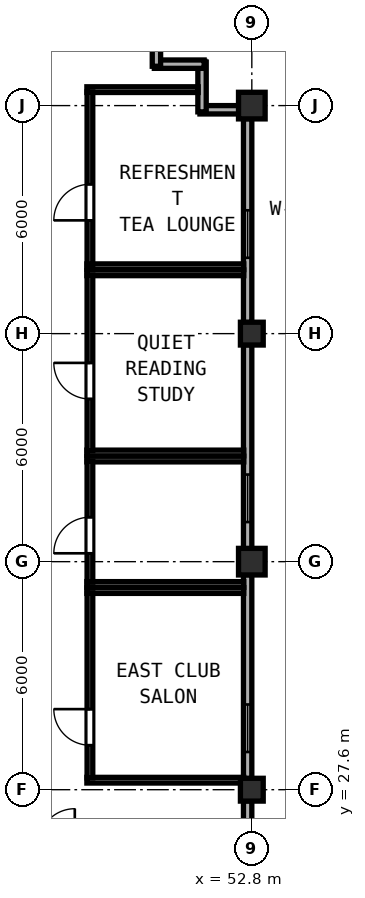
"""IFC4 building model, lengths in metres.
Left out: names, types, materials, properties, quantities, classifications, styles, units other than length and angle.
Written with IfcOpenShell. Run it as: python <this file> out.ifc"""

import sys

from ifc_helpers import new_model, si_unit, direction, frame, frame_2d, origin, origin_2d, place, context, subcontext, project, spatial, rectangle, hollow_rectangle, extrude, element, fill, save


model = new_model("IFC4")
c1 = context("Model", 3, precision=1e-05, world=origin(), true_north=direction((0.0, 1.0)))
c2 = subcontext(c1, "Body", "Model", "MODEL_VIEW")
j1 = project(units=[si_unit("LENGTHUNIT", "METRE"), si_unit("PLANEANGLEUNIT", "RADIAN")], contexts=[c1])
p1 = place(None, origin())
s1 = spatial("IfcSite", under=j1, at=p1, CompositionType="ELEMENT")
p2 = place(p1, origin())
s2 = spatial("IfcBuilding", under=s1, at=p2, CompositionType="ELEMENT")
p3 = place(p2, frame((0.0, 0.0, 293.9)))
s3 = spatial("IfcBuildingStorey", under=s2, at=p3, CompositionType="ELEMENT", Elevation=293.9)
for number, where, z_axis, x_axis in (
    (1, (52.8, 33.6, 0.0), (0.0, 0.0, 1.0), (1.0, 0.0, 0.0)),
    (2, (52.8, 45.6, 0.0), (0.0, 0.0, 1.0), (1.0, 0.0, 0.0)),
):
    element("IfcColumn", number, at=place(p3, frame(where, z_axis=z_axis, x_axis=x_axis)), inside=s3, PredefinedType="COLUMN", context=c2, shape_type="SweptSolid", body=[
        extrude(hollow_rectangle(XDim=0.7, YDim=0.7, WallThickness=0.026, at=origin_2d()), origin(), (0.0, 0.0, 1.0), 3.9),
    ])
for number, where, z_axis, x_axis in (
    (3, (52.8, 27.6, 0.0), (0.0, 0.0, 1.0), (1.0, 0.0, 0.0)),
    (4, (52.8, 39.6, 0.0), (0.0, 0.0, 1.0), (1.0, 0.0, 0.0)),
):
    element("IfcColumn", number, at=place(p3, frame(where, z_axis=z_axis, x_axis=x_axis)), inside=s3, PredefinedType="COLUMN", context=c2, shape_type="SweptSolid", body=[
        extrude(hollow_rectangle(XDim=0.6, YDim=0.6, WallThickness=0.024, at=origin_2d()), origin(), (0.0, 0.0, 1.0), 3.9),
    ])
p4 = place(p3, frame((52.69, 21.942, 0.0), z_axis=(0.0, 0.0, 1.0), x_axis=(0.0, 1.0, 0.0)))
e5 = element("IfcWall", 5, at=p4, inside=s3, PredefinedType="SOLIDWALL", context=c2, shape_type="SweptSolid", body=[
    extrude(rectangle(XDim=5.366, YDim=0.22, at=frame_2d((2.683, 0.0))), origin(), (0.0, 0.0, 1.0), 3.365),
])
p5 = place(p4, frame((0.7, 0.0, 0.85)))
e6 = element("IfcOpeningElement", 6, at=p5, cuts=e5, PredefinedType="OPENING", context=c2, shape_type="SweptSolid", body=[
    extrude(rectangle(XDim=1.25, YDim=1.95, at=frame_2d((0.625, 0.975))), frame((0.0, 0.12, 0.0), z_axis=(0.0, -1.0, 0.0), x_axis=(1.0, 0.0, 0.0)), (0.0, 0.0, 1.0), 0.24),
])
p6 = place(p3, frame((52.69, 27.892, 0.0), z_axis=(0.0, 0.0, 1.0), x_axis=(0.0, 1.0, 0.0)))
e7 = element("IfcWall", 7, at=p6, inside=s3, PredefinedType="SOLIDWALL", context=c2, shape_type="SweptSolid", body=[
    extrude(rectangle(XDim=5.366, YDim=0.22, at=frame_2d((2.683, 0.0))), origin(), (0.0, 0.0, 1.0), 3.365),
])
p7 = place(p6, frame((0.7, 0.0, 0.85)))
e8 = element("IfcOpeningElement", 8, at=p7, cuts=e7, PredefinedType="OPENING", context=c2, shape_type="SweptSolid", body=[
    extrude(rectangle(XDim=1.25, YDim=1.95, at=frame_2d((0.625, 0.975))), frame((0.0, 0.12, 0.0), z_axis=(0.0, -1.0, 0.0), x_axis=(1.0, 0.0, 0.0)), (0.0, 0.0, 1.0), 0.24),
])
p8 = place(p3, frame((52.69, 33.942, 0.0), z_axis=(0.0, 0.0, 1.0), x_axis=(0.0, 1.0, 0.0)))
e9 = element("IfcWall", 9, at=p8, inside=s3, PredefinedType="SOLIDWALL", context=c2, shape_type="SweptSolid", body=[
    extrude(rectangle(XDim=5.366, YDim=0.22, at=frame_2d((2.683, 0.0))), origin(), (0.0, 0.0, 1.0), 3.365),
])
p9 = place(p8, frame((0.7, 0.0, 0.85)))
e10 = element("IfcOpeningElement", 10, at=p9, cuts=e9, PredefinedType="OPENING", context=c2, shape_type="SweptSolid", body=[
    extrude(rectangle(XDim=1.25, YDim=1.95, at=frame_2d((0.625, 0.975))), frame((0.0, 0.12, 0.0), z_axis=(0.0, -1.0, 0.0), x_axis=(1.0, 0.0, 0.0)), (0.0, 0.0, 1.0), 0.24),
])
p10 = place(p3, frame((52.69, 39.892, 0.0), z_axis=(0.0, 0.0, 1.0), x_axis=(0.0, 1.0, 0.0)))
e11 = element("IfcWall", 11, at=p10, inside=s3, PredefinedType="SOLIDWALL", context=c2, shape_type="SweptSolid", body=[
    extrude(rectangle(XDim=5.366, YDim=0.22, at=frame_2d((2.683, 0.0))), origin(), (0.0, 0.0, 1.0), 3.365),
])
p11 = place(p10, frame((1.703, 0.0, 0.85)))
e12 = element("IfcOpeningElement", 12, at=p11, cuts=e11, PredefinedType="OPENING", context=c2, shape_type="SweptSolid", body=[
    extrude(rectangle(XDim=1.25, YDim=1.95, at=frame_2d((0.625, 0.975))), frame((0.0, 0.12, 0.0), z_axis=(0.0, -1.0, 0.0), x_axis=(1.0, 0.0, 0.0)), (0.0, 0.0, 1.0), 0.24),
])
p12 = place(p3, frame((52.458, 45.49, 0.0), z_axis=(0.0, 0.0, 1.0), x_axis=(-1.0, 0.0, 0.0)))
e13 = element("IfcWall", 13, at=p12, inside=s3, PredefinedType="SOLIDWALL", context=c2, shape_type="SweptSolid", body=[
    extrude(rectangle(XDim=1.023, YDim=0.22, at=frame_2d((0.511, 0.0))), origin(), (0.0, 0.0, 1.0), 3.72),
])
p13 = place(p3, frame((51.49, 45.435, 0.0), z_axis=(0.0, 0.0, 1.0), x_axis=(0.0, 1.0, 0.0)))
e14 = element("IfcWall", 14, at=p13, inside=s3, PredefinedType="SOLIDWALL", context=c2, shape_type="SweptSolid", body=[
    extrude(rectangle(XDim=1.31, YDim=0.22, at=frame_2d((0.655, 0.0))), origin(), (0.0, 0.0, 1.0), 3.72),
])
p14 = place(p3, frame((51.545, 46.69, 0.0), z_axis=(0.0, 0.0, 1.0), x_axis=(-1.0, 0.0, 0.0)))
e15 = element("IfcWall", 15, at=p14, inside=s3, PredefinedType="SOLIDWALL", context=c2, shape_type="SweptSolid", body=[
    extrude(rectangle(XDim=1.31, YDim=0.22, at=frame_2d((0.655, 0.0))), origin(), (0.0, 0.0, 1.0), 3.72),
])
p15 = place(p3, frame((50.29, 46.635, 0.0), z_axis=(0.0, 0.0, 1.0), x_axis=(0.0, 1.0, 0.0)))
e16 = element("IfcWall", 16, at=p15, inside=s3, PredefinedType="SOLIDWALL", context=c2, shape_type="SweptSolid", body=[
    extrude(rectangle(XDim=1.535, YDim=0.22, at=frame_2d((0.768, 0.0))), origin(), (0.0, 0.0, 1.0), 3.72),
])
for number, where, z_axis, x_axis in (
    (17, (48.46, 36.3, 0.0), (0.0, 0.0, 1.0), (1.0, 0.0, 0.0)),
    (18, (48.46, 33.0, 0.0), (0.0, 0.0, 1.0), (1.0, 0.0, 0.0)),
):
    element("IfcWall", number, at=place(p3, frame(where, z_axis=z_axis, x_axis=x_axis)), inside=s3, PredefinedType="PARTITIONING", context=c2, shape_type="SweptSolid", body=[
        extrude(rectangle(XDim=4.128, YDim=0.15, at=frame_2d((2.064, 0.0))), origin(), (0.0, 0.0, 1.0), 3.72),
    ])
p16 = place(p3, frame((48.54, 33.06, 0.0), z_axis=(0.0, 0.0, 1.0), x_axis=(0.0, 1.0, 0.0)))
e19 = element("IfcWall", 19, at=p16, inside=s3, PredefinedType="PARTITIONING", context=c2, shape_type="SweptSolid", body=[
    extrude(rectangle(XDim=3.18, YDim=0.15, at=frame_2d((1.59, 0.0))), origin(), (0.0, 0.0, 1.0), 3.72),
])
p17 = place(p16, frame((0.76, 0.0, 0.0)))
e20 = element("IfcOpeningElement", 20, at=p17, cuts=e19, PredefinedType="OPENING", context=c2, shape_type="SweptSolid", body=[
    extrude(rectangle(XDim=0.95, YDim=2.12, at=frame_2d((0.475, 1.06))), frame((0.0, 0.085, 0.0), z_axis=(0.0, -1.0, 0.0), x_axis=(1.0, 0.0, 0.0)), (0.0, 0.0, 1.0), 0.17),
])
for number, where, z_axis, x_axis in (
    (21, (48.46, 41.2, 0.0), (0.0, 0.0, 1.0), (1.0, 0.0, 0.0)),
    (22, (48.46, 36.46, 0.0), (0.0, 0.0, 1.0), (1.0, 0.0, 0.0)),
):
    element("IfcWall", number, at=place(p3, frame(where, z_axis=z_axis, x_axis=x_axis)), inside=s3, PredefinedType="PARTITIONING", context=c2, shape_type="SweptSolid", body=[
        extrude(rectangle(XDim=4.128, YDim=0.15, at=frame_2d((2.064, 0.0))), origin(), (0.0, 0.0, 1.0), 3.72),
    ])
p18 = place(p3, frame((48.54, 36.52, 0.0), z_axis=(0.0, 0.0, 1.0), x_axis=(0.0, 1.0, 0.0)))
e23 = element("IfcWall", 23, at=p18, inside=s3, PredefinedType="PARTITIONING", context=c2, shape_type="SweptSolid", body=[
    extrude(rectangle(XDim=4.62, YDim=0.15, at=frame_2d((2.31, 0.0))), origin(), (0.0, 0.0, 1.0), 3.72),
])
p19 = place(p18, frame((1.36, 0.0, 0.0)))
e24 = element("IfcOpeningElement", 24, at=p19, cuts=e23, PredefinedType="OPENING", context=c2, shape_type="SweptSolid", body=[
    extrude(rectangle(XDim=0.95, YDim=2.12, at=frame_2d((0.475, 1.06))), frame((0.0, 0.085, 0.0), z_axis=(0.0, -1.0, 0.0), x_axis=(1.0, 0.0, 0.0)), (0.0, 0.0, 1.0), 0.17),
])
p20 = place(p3, frame((48.46, 46.02, 0.0), z_axis=(0.0, 0.0, 1.0), x_axis=(1.0, 0.0, 0.0)))
e25 = element("IfcWall", 25, at=p20, inside=s3, PredefinedType="PARTITIONING", context=c2, shape_type="SweptSolid", body=[
    extrude(rectangle(XDim=2.928, YDim=0.15, at=frame_2d((1.464, 0.0))), origin(), (0.0, 0.0, 1.0), 3.72),
])
p21 = place(p3, frame((48.46, 41.36, 0.0), z_axis=(0.0, 0.0, 1.0), x_axis=(1.0, 0.0, 0.0)))
e26 = element("IfcWall", 26, at=p21, inside=s3, PredefinedType="PARTITIONING", context=c2, shape_type="SweptSolid", body=[
    extrude(rectangle(XDim=4.128, YDim=0.15, at=frame_2d((2.064, 0.0))), origin(), (0.0, 0.0, 1.0), 3.72),
])
p22 = place(p3, frame((48.54, 41.42, 0.0), z_axis=(0.0, 0.0, 1.0), x_axis=(0.0, 1.0, 0.0)))
e27 = element("IfcWall", 27, at=p22, inside=s3, PredefinedType="PARTITIONING", context=c2, shape_type="SweptSolid", body=[
    extrude(rectangle(XDim=4.54, YDim=0.15, at=frame_2d((2.27, 0.0))), origin(), (0.0, 0.0, 1.0), 3.72),
])
p23 = place(p22, frame((1.16, 0.0, 0.0)))
e28 = element("IfcOpeningElement", 28, at=p23, cuts=e27, PredefinedType="OPENING", context=c2, shape_type="SweptSolid", body=[
    extrude(rectangle(XDim=0.95, YDim=2.12, at=frame_2d((0.475, 1.06))), frame((0.0, 0.085, 0.0), z_axis=(0.0, -1.0, 0.0), x_axis=(1.0, 0.0, 0.0)), (0.0, 0.0, 1.0), 0.17),
])
for number, where, z_axis, x_axis in (
    (29, (48.46, 32.84, 0.0), (0.0, 0.0, 1.0), (1.0, 0.0, 0.0)),
    (30, (48.46, 27.85, 0.0), (0.0, 0.0, 1.0), (1.0, 0.0, 0.0)),
):
    element("IfcWall", number, at=place(p3, frame(where, z_axis=z_axis, x_axis=x_axis)), inside=s3, PredefinedType="PARTITIONING", context=c2, shape_type="SweptSolid", body=[
        extrude(rectangle(XDim=4.128, YDim=0.15, at=frame_2d((2.064, 0.0))), origin(), (0.0, 0.0, 1.0), 3.72),
    ])
p24 = place(p3, frame((48.54, 27.91, 0.0), z_axis=(0.0, 0.0, 1.0), x_axis=(0.0, 1.0, 0.0)))
e31 = element("IfcWall", 31, at=p24, inside=s3, PredefinedType="PARTITIONING", context=c2, shape_type="SweptSolid", body=[
    extrude(rectangle(XDim=4.87, YDim=0.15, at=frame_2d((2.435, 0.0))), origin(), (0.0, 0.0, 1.0), 3.72),
])
p25 = place(p24, frame((0.86, 0.0, 0.0)))
e32 = element("IfcOpeningElement", 32, at=p25, cuts=e31, PredefinedType="OPENING", context=c2, shape_type="SweptSolid", body=[
    extrude(rectangle(XDim=0.95, YDim=2.12, at=frame_2d((0.475, 1.06))), frame((0.0, 0.085, 0.0), z_axis=(0.0, -1.0, 0.0), x_axis=(1.0, 0.0, 0.0)), (0.0, 0.0, 1.0), 0.17),
])
p26 = place(p7, origin())
e33 = element("IfcWindow", 33, at=p26, inside=s3, PartitioningType="SINGLE_PANEL", PredefinedType="WINDOW", context=c2, shape_type="SweptSolid", body=[
    extrude(rectangle(XDim=1.25, YDim=1.95, at=frame_2d((0.625, 0.975))), frame((0.0, 0.03, 0.0), z_axis=(0.0, -1.0, 0.0), x_axis=(1.0, 0.0, 0.0)), (0.0, 0.0, 1.0), 0.06),
])
fill(e8, e33)
p27 = place(p9, origin())
e34 = element("IfcWindow", 34, at=p27, inside=s3, PartitioningType="SINGLE_PANEL", PredefinedType="WINDOW", context=c2, shape_type="SweptSolid", body=[
    extrude(rectangle(XDim=1.25, YDim=1.95, at=frame_2d((0.625, 0.975))), frame((0.0, 0.03, 0.0), z_axis=(0.0, -1.0, 0.0), x_axis=(1.0, 0.0, 0.0)), (0.0, 0.0, 1.0), 0.06),
])
fill(e10, e34)
p28 = place(p11, origin())
e35 = element("IfcWindow", 35, at=p28, inside=s3, PartitioningType="SINGLE_PANEL", PredefinedType="WINDOW", context=c2, shape_type="SweptSolid", body=[
    extrude(rectangle(XDim=1.25, YDim=1.95, at=frame_2d((0.625, 0.975))), frame((0.0, 0.03, 0.0), z_axis=(0.0, -1.0, 0.0), x_axis=(1.0, 0.0, 0.0)), (0.0, 0.0, 1.0), 0.06),
])
fill(e12, e35)
p29 = place(p17, origin())
e36 = element("IfcDoor", 36, at=p29, inside=s3, OperationType="SINGLE_SWING_LEFT", PredefinedType="DOOR", context=c2, shape_type="SweptSolid", body=[
    extrude(rectangle(XDim=0.95, YDim=2.12, at=frame_2d((0.475, 1.06))), frame((0.0, 0.025, 0.0), z_axis=(0.0, -1.0, 0.0), x_axis=(1.0, 0.0, 0.0)), (0.0, 0.0, 1.0), 0.05),
])
fill(e20, e36)
p30 = place(p19, origin())
e37 = element("IfcDoor", 37, at=p30, inside=s3, OperationType="SINGLE_SWING_RIGHT", PredefinedType="DOOR", context=c2, shape_type="SweptSolid", body=[
    extrude(rectangle(XDim=0.95, YDim=2.12, at=frame_2d((0.475, 1.06))), frame((0.0, 0.025, 0.0), z_axis=(0.0, -1.0, 0.0), x_axis=(1.0, 0.0, 0.0)), (0.0, 0.0, 1.0), 0.05),
])
fill(e24, e37)
p31 = place(p23, origin())
e38 = element("IfcDoor", 38, at=p31, inside=s3, OperationType="SINGLE_SWING_LEFT", PredefinedType="DOOR", context=c2, shape_type="SweptSolid", body=[
    extrude(rectangle(XDim=0.95, YDim=2.12, at=frame_2d((0.475, 1.06))), frame((0.0, 0.025, 0.0), z_axis=(0.0, -1.0, 0.0), x_axis=(1.0, 0.0, 0.0)), (0.0, 0.0, 1.0), 0.05),
])
fill(e28, e38)
p32 = place(p25, origin())
e39 = element("IfcDoor", 39, at=p32, inside=s3, OperationType="SINGLE_SWING_RIGHT", PredefinedType="DOOR", context=c2, shape_type="SweptSolid", body=[
    extrude(rectangle(XDim=0.95, YDim=2.12, at=frame_2d((0.475, 1.06))), frame((0.0, 0.025, 0.0), z_axis=(0.0, -1.0, 0.0), x_axis=(1.0, 0.0, 0.0)), (0.0, 0.0, 1.0), 0.05),
])
fill(e32, e39)
save(model, sys.argv[1])
